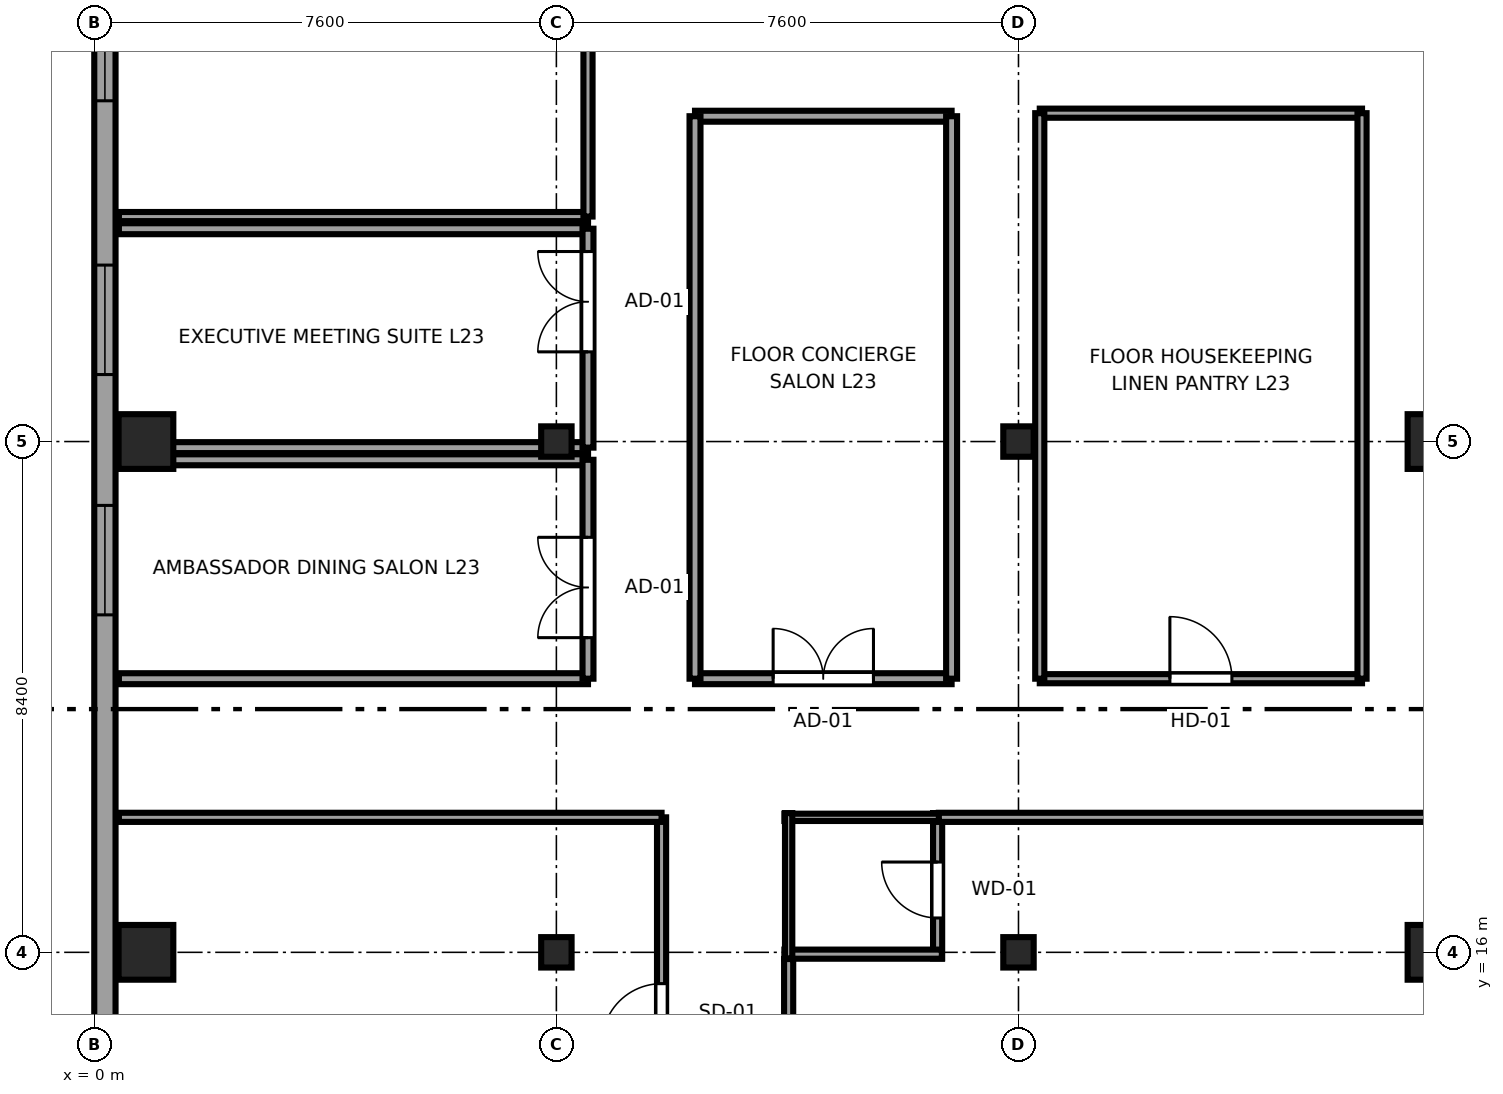
"""IFC4 building model, lengths in metres.
Left out: names, types, materials, properties, quantities, classifications, styles, units other than length and angle.
Written with IfcOpenShell. Run it as: python <this file> out.ifc"""

import sys

from ifc_helpers import new_model, si_unit, direction, frame, frame_2d, origin, origin_2d, place, context, subcontext, project, spatial, rectangle, i_section, extrude, source, transform, mapped, element, fill, save


model = new_model("IFC4")
c1 = context("Model", 3, precision=1e-05, world=origin(), true_north=direction((0.0, 1.0)))
c2 = subcontext(c1, "Body", "Model", "MODEL_VIEW")
j1 = project(units=[si_unit("LENGTHUNIT", "METRE"), si_unit("PLANEANGLEUNIT", "RADIAN")], contexts=[c1])
p1 = place(None, origin())
s1 = spatial("IfcSite", under=j1, at=p1, CompositionType="ELEMENT")
p2 = place(p1, origin())
s2 = spatial("IfcBuilding", under=s1, at=p2, CompositionType="ELEMENT")
p3 = place(p2, frame((0.0, 0.0, 92.35)))
s3 = spatial("IfcBuildingStorey", under=s2, at=p3, CompositionType="ELEMENT", Elevation=92.35)
m1 = source(origin(), c2, "Body", "SweptSolid", [
    extrude(rectangle(XDim=0.9, YDim=0.9, at=origin_2d()), origin(), (0.0, 0.0, 1.0), 3.55),
])
for number, where, z_axis, x_axis in (
    (1, (0.85, 16.0, 0.0), (0.0, 0.0, 1.0), (1.0, 0.0, 0.0)),
    (2, (0.85, 24.4, 0.0), (0.0, 0.0, 1.0), (1.0, 0.0, 0.0)),
):
    element("IfcColumn", number, at=place(p3, frame(where, z_axis=z_axis, x_axis=x_axis)), inside=s3, PredefinedType="COLUMN", context=c2, shape_type="MappedRepresentation", body=[
        mapped(m1, transform((0.0, 0.0, 0.0), x_axis=(1.0, 0.0, 0.0), y_axis=(0.0, 1.0, 0.0), z_axis=(0.0, 0.0, 1.0), scale=1.0)),
    ])
m2 = source(origin(), c2, "Body", "SweptSolid", [
    extrude(i_section(OverallWidth=0.5, OverallDepth=0.5, WebThickness=0.022, FlangeThickness=0.034, at=origin_2d()), origin(), (0.0, 0.0, 1.0), 3.55),
])
for number, where, z_axis, x_axis in (
    (3, (7.6, 16.0, 0.0), (0.0, 0.0, 1.0), (1.0, 0.0, 0.0)),
    (4, (7.6, 24.4, 0.0), (0.0, 0.0, 1.0), (1.0, 0.0, 0.0)),
    (5, (15.2, 16.0, 0.0), (0.0, 0.0, 1.0), (1.0, 0.0, 0.0)),
    (6, (15.2, 24.4, 0.0), (0.0, 0.0, 1.0), (1.0, 0.0, 0.0)),
):
    element("IfcColumn", number, at=place(p3, frame(where, z_axis=z_axis, x_axis=x_axis)), inside=s3, PredefinedType="COLUMN", context=c2, shape_type="MappedRepresentation", body=[
        mapped(m2, transform((0.0, 0.0, 0.0), x_axis=(1.0, 0.0, 0.0), y_axis=(0.0, 1.0, 0.0), z_axis=(0.0, 0.0, 1.0), scale=1.0)),
    ])
for number, where, z_axis, x_axis in (
    (7, (22.05, 16.0, 0.0), (0.0, 0.0, 1.0), (1.0, 0.0, 0.0)),
    (8, (22.05, 24.4, 0.0), (0.0, 0.0, 1.0), (1.0, 0.0, 0.0)),
):
    element("IfcColumn", number, at=place(p3, frame(where, z_axis=z_axis, x_axis=x_axis)), inside=s3, PredefinedType="COLUMN", context=c2, shape_type="MappedRepresentation", body=[
        mapped(m1, transform((0.0, 0.0, 0.0), x_axis=(1.0, 0.0, 0.0), y_axis=(0.0, 1.0, 0.0), z_axis=(0.0, 0.0, 1.0), scale=1.0)),
    ])
p4 = place(p3, frame((0.175, 41.383, 0.0), z_axis=(0.0, 0.0, 1.0), x_axis=(0.0, -1.0, 0.0)))
e9 = element("IfcWall", 9, at=p4, inside=s3, PredefinedType="SOLIDWALL", context=c2, shape_type="SweptSolid", body=[
    extrude(rectangle(XDim=36.766, YDim=0.35, at=frame_2d((18.383, 0.0))), origin(), (0.0, 0.0, 1.0), 3.25),
])
p5 = place(p4, frame((1.676, 0.0, 0.68)))
e10 = element("IfcOpeningElement", 10, at=p5, cuts=e9, PredefinedType="OPENING", context=c2, shape_type="SweptSolid", body=[
    extrude(rectangle(XDim=1.8, YDim=1.85, at=frame_2d((0.9, 0.925))), frame((0.0, 0.185, 0.0), z_axis=(0.0, -1.0, 0.0), x_axis=(1.0, 0.0, 0.0)), (0.0, 0.0, 1.0), 0.37),
])
p6 = place(p4, frame((4.578, 0.0, 0.68)))
e11 = element("IfcOpeningElement", 11, at=p6, cuts=e9, PredefinedType="OPENING", context=c2, shape_type="SweptSolid", body=[
    extrude(rectangle(XDim=1.8, YDim=1.85, at=frame_2d((0.9, 0.925))), frame((0.0, 0.185, 0.0), z_axis=(0.0, -1.0, 0.0), x_axis=(1.0, 0.0, 0.0)), (0.0, 0.0, 1.0), 0.37),
])
p7 = place(p4, frame((9.579, 0.0, 0.68)))
e12 = element("IfcOpeningElement", 12, at=p7, cuts=e9, PredefinedType="OPENING", context=c2, shape_type="SweptSolid", body=[
    extrude(rectangle(XDim=1.8, YDim=1.85, at=frame_2d((0.9, 0.925))), frame((0.0, 0.185, 0.0), z_axis=(0.0, -1.0, 0.0), x_axis=(1.0, 0.0, 0.0)), (0.0, 0.0, 1.0), 0.37),
])
p8 = place(p4, frame((14.081, 0.0, 0.68)))
e13 = element("IfcOpeningElement", 13, at=p8, cuts=e9, PredefinedType="OPENING", context=c2, shape_type="SweptSolid", body=[
    extrude(rectangle(XDim=1.8, YDim=1.85, at=frame_2d((0.9, 0.925))), frame((0.0, 0.185, 0.0), z_axis=(0.0, -1.0, 0.0), x_axis=(1.0, 0.0, 0.0)), (0.0, 0.0, 1.0), 0.37),
])
p9 = place(p4, frame((18.033, 0.0, 0.68)))
e14 = element("IfcOpeningElement", 14, at=p9, cuts=e9, PredefinedType="OPENING", context=c2, shape_type="SweptSolid", body=[
    extrude(rectangle(XDim=1.8, YDim=1.85, at=frame_2d((0.9, 0.925))), frame((0.0, 0.185, 0.0), z_axis=(0.0, -1.0, 0.0), x_axis=(1.0, 0.0, 0.0)), (0.0, 0.0, 1.0), 0.37),
])
p10 = place(p4, frame((26.436, 0.0, 0.68)))
e15 = element("IfcOpeningElement", 15, at=p10, cuts=e9, PredefinedType="OPENING", context=c2, shape_type="SweptSolid", body=[
    extrude(rectangle(XDim=1.8, YDim=1.85, at=frame_2d((0.9, 0.925))), frame((0.0, 0.185, 0.0), z_axis=(0.0, -1.0, 0.0), x_axis=(1.0, 0.0, 0.0)), (0.0, 0.0, 1.0), 0.37),
])
p11 = place(p4, frame((29.338, 0.0, 0.68)))
e16 = element("IfcOpeningElement", 16, at=p11, cuts=e9, PredefinedType="OPENING", context=c2, shape_type="SweptSolid", body=[
    extrude(rectangle(XDim=1.8, YDim=1.85, at=frame_2d((0.9, 0.925))), frame((0.0, 0.185, 0.0), z_axis=(0.0, -1.0, 0.0), x_axis=(1.0, 0.0, 0.0)), (0.0, 0.0, 1.0), 0.37),
])
p12 = place(p4, frame((34.34, 0.0, 0.68)))
e17 = element("IfcOpeningElement", 17, at=p12, cuts=e9, PredefinedType="OPENING", context=c2, shape_type="SweptSolid", body=[
    extrude(rectangle(XDim=1.8, YDim=1.85, at=frame_2d((0.9, 0.925))), frame((0.0, 0.185, 0.0), z_axis=(0.0, -1.0, 0.0), x_axis=(1.0, 0.0, 0.0)), (0.0, 0.0, 1.0), 0.37),
])
p13 = place(p3, frame((13.87, 15.9, 0.0), z_axis=(0.0, 0.0, 1.0), x_axis=(0.0, 1.0, 0.0)))
e18 = element("IfcWall", 18, at=p13, inside=s3, PredefinedType="PARTITIONING", context=c2, shape_type="SweptSolid", body=[
    extrude(rectangle(XDim=2.39, YDim=0.15, at=frame_2d((1.195, 0.0))), origin(), (0.0, 0.0, 1.0), 3.25),
])
p14 = place(p13, frame((0.665, 0.0, 0.0)))
e19 = element("IfcOpeningElement", 19, at=p14, cuts=e18, PredefinedType="OPENING", context=c2, shape_type="SweptSolid", body=[
    extrude(rectangle(XDim=0.92, YDim=2.01, at=frame_2d((0.46, 1.005))), frame((0.0, 0.085, 0.0), z_axis=(0.0, -1.0, 0.0), x_axis=(1.0, 0.0, 0.0)), (0.0, 0.0, 1.0), 0.17),
])
p15 = place(p3, frame((11.35, 15.97, 0.0), z_axis=(0.0, 0.0, 1.0), x_axis=(1.0, 0.0, 0.0)))
e20 = element("IfcWall", 20, at=p15, inside=s3, PredefinedType="PARTITIONING", context=c2, shape_type="SweptSolid", body=[
    extrude(rectangle(XDim=2.59, YDim=0.15, at=frame_2d((1.295, 0.0))), origin(), (0.0, 0.0, 1.0), 2.628),
])
p16 = place(p3, frame((11.35, 18.22, 0.0), z_axis=(0.0, 0.0, 1.0), x_axis=(1.0, 0.0, 0.0)))
e21 = element("IfcWall", 21, at=p16, inside=s3, PredefinedType="PLUMBINGWALL", context=c2, shape_type="SweptSolid", body=[
    extrude(rectangle(XDim=2.59, YDim=0.12, at=frame_2d((1.295, 0.0))), origin(), (0.0, 0.0, 1.0), 3.25),
])
p17 = place(p3, frame((11.42, 15.9, 0.0), z_axis=(0.0, 0.0, 1.0), x_axis=(0.0, 1.0, 0.0)))
e22 = element("IfcWall", 22, at=p17, inside=s3, PredefinedType="PLUMBINGWALL", context=c2, shape_type="SweptSolid", body=[
    extrude(rectangle(XDim=2.39, YDim=0.12, at=frame_2d((1.195, 0.0))), origin(), (0.0, 0.0, 1.0), 2.834),
])
p18 = place(p3, frame((9.33, 11.81, 0.0), z_axis=(0.0, 0.0, 1.0), x_axis=(0.0, 1.0, 0.0)))
e23 = element("IfcWall", 23, at=p18, inside=s3, PredefinedType="PARTITIONING", context=c2, shape_type="SweptSolid", body=[
    extrude(rectangle(XDim=6.41, YDim=0.15, at=frame_2d((3.205, 0.0))), origin(), (0.0, 0.0, 1.0), 3.25),
])
p19 = place(p18, frame((2.695, 0.0, 0.0)))
e24 = element("IfcOpeningElement", 24, at=p19, cuts=e23, PredefinedType="OPENING", context=c2, shape_type="SweptSolid", body=[
    extrude(rectangle(XDim=0.98, YDim=2.12, at=frame_2d((0.49, 1.06))), frame((0.0, 0.085, 0.0), z_axis=(0.0, -1.0, 0.0), x_axis=(1.0, 0.0, 0.0)), (0.0, 0.0, 1.0), 0.17),
])
p20 = place(p3, frame((0.405, 18.22, 0.0), z_axis=(0.0, 0.0, 1.0), x_axis=(1.0, 0.0, 0.0)))
e25 = element("IfcWall", 25, at=p20, inside=s3, PredefinedType="PARTITIONING", context=c2, shape_type="SweptSolid", body=[
    extrude(rectangle(XDim=8.925, YDim=0.15, at=frame_2d((4.462, 0.0))), origin(), (0.0, 0.0, 1.0), 3.25),
])
p21 = place(p3, frame((11.42, 0.405, 0.0), z_axis=(0.0, 0.0, 1.0), x_axis=(0.0, 1.0, 0.0)))
e26 = element("IfcWall", 26, at=p21, inside=s3, PredefinedType="PARTITIONING", context=c2, shape_type="SweptSolid", body=[
    extrude(rectangle(XDim=15.485, YDim=0.15, at=frame_2d((7.742, 0.0))), origin(), (0.0, 0.0, 1.0), 2.834),
])
p22 = place(p21, frame((7.26, 0.0, 0.0)))
e27 = element("IfcOpeningElement", 27, at=p22, cuts=e26, PredefinedType="OPENING", context=c2, shape_type="SweptSolid", body=[
    extrude(rectangle(XDim=0.98, YDim=2.12, at=frame_2d((0.49, 1.06))), frame((0.0, 0.085, 0.0), z_axis=(0.0, -1.0, 0.0), x_axis=(1.0, 0.0, 0.0)), (0.0, 0.0, 1.0), 0.17),
])
p23 = place(p3, frame((13.89, 18.22, 0.0), z_axis=(0.0, 0.0, 1.0), x_axis=(1.0, 0.0, 0.0)))
e28 = element("IfcWall", 28, at=p23, inside=s3, PredefinedType="PARTITIONING", context=c2, shape_type="SweptSolid", body=[
    extrude(rectangle(XDim=8.46, YDim=0.15, at=frame_2d((4.23, 0.0))), origin(), (0.0, 0.0, 1.0), 3.25),
])
for number, where, z_axis, x_axis in (
    (29, (0.405, 20.5, 0.0), (0.0, 0.0, 1.0), (1.0, 0.0, 0.0)),
    (30, (0.405, 24.1, 0.0), (0.0, 0.0, 1.0), (1.0, 0.0, 0.0)),
):
    element("IfcWall", number, at=place(p3, frame(where, z_axis=z_axis, x_axis=x_axis)), inside=s3, PredefinedType="PARTITIONING", context=c2, shape_type="SweptSolid", body=[
        extrude(rectangle(XDim=7.715, YDim=0.18, at=frame_2d((3.857, 0.0))), origin(), (0.0, 0.0, 1.0), 3.25),
    ])
p24 = place(p3, frame((8.12, 20.5, 0.0), z_axis=(0.0, 0.0, 1.0), x_axis=(0.0, 1.0, 0.0)))
e31 = element("IfcWall", 31, at=p24, inside=s3, PredefinedType="PARTITIONING", context=c2, shape_type="SweptSolid", body=[
    extrude(rectangle(XDim=3.6, YDim=0.18, at=frame_2d((1.8, 0.0))), origin(), (0.0, 0.0, 1.0), 3.25),
])
p25 = place(p24, frame((0.675, 0.0, 0.0)))
e32 = element("IfcOpeningElement", 32, at=p25, cuts=e31, PredefinedType="OPENING", context=c2, shape_type="SweptSolid", body=[
    extrude(rectangle(XDim=1.65, YDim=2.15, at=frame_2d((0.825, 1.075))), frame((0.0, 0.1, 0.0), z_axis=(0.0, -1.0, 0.0), x_axis=(1.0, 0.0, 0.0)), (0.0, 0.0, 1.0), 0.2),
])
p26 = place(p3, frame((0.405, 24.3, 0.0), z_axis=(0.0, 0.0, 1.0), x_axis=(1.0, 0.0, 0.0)))
e33 = element("IfcWall", 33, at=p26, inside=s3, PredefinedType="PARTITIONING", context=c2, shape_type="SweptSolid", body=[
    extrude(rectangle(XDim=7.715, YDim=0.18, at=frame_2d((3.857, 0.0))), origin(), (0.0, 0.0, 1.0), 2.628),
])
p27 = place(p3, frame((0.405, 27.9, 0.0), z_axis=(0.0, 0.0, 1.0), x_axis=(1.0, 0.0, 0.0)))
e34 = element("IfcWall", 34, at=p27, inside=s3, PredefinedType="PARTITIONING", context=c2, shape_type="SweptSolid", body=[
    extrude(rectangle(XDim=7.715, YDim=0.18, at=frame_2d((3.857, 0.0))), origin(), (0.0, 0.0, 1.0), 3.25),
])
p28 = place(p3, frame((8.12, 24.3, 0.0), z_axis=(0.0, 0.0, 1.0), x_axis=(0.0, 1.0, 0.0)))
e35 = element("IfcWall", 35, at=p28, inside=s3, PredefinedType="PARTITIONING", context=c2, shape_type="SweptSolid", body=[
    extrude(rectangle(XDim=3.6, YDim=0.18, at=frame_2d((1.8, 0.0))), origin(), (0.0, 0.0, 1.0), 3.25),
])
p29 = place(p28, frame((1.575, 0.0, 0.0)))
e36 = element("IfcOpeningElement", 36, at=p29, cuts=e35, PredefinedType="OPENING", context=c2, shape_type="SweptSolid", body=[
    extrude(rectangle(XDim=1.65, YDim=2.15, at=frame_2d((0.825, 1.075))), frame((0.0, 0.1, 0.0), z_axis=(0.0, -1.0, 0.0), x_axis=(1.0, 0.0, 0.0)), (0.0, 0.0, 1.0), 0.2),
])
p30 = place(p3, frame((0.405, 28.1, 0.0), z_axis=(0.0, 0.0, 1.0), x_axis=(1.0, 0.0, 0.0)))
e37 = element("IfcWall", 37, at=p30, inside=s3, PredefinedType="PARTITIONING", context=c2, shape_type="SweptSolid", body=[
    extrude(rectangle(XDim=7.715, YDim=0.15, at=frame_2d((3.857, 0.0))), origin(), (0.0, 0.0, 1.0), 3.25),
])
p31 = place(p3, frame((8.12, 28.1, 0.0), z_axis=(0.0, 0.0, 1.0), x_axis=(0.0, 1.0, 0.0)))
e38 = element("IfcWall", 38, at=p31, inside=s3, PredefinedType="PARTITIONING", context=c2, shape_type="SweptSolid", body=[
    extrude(rectangle(XDim=17.495, YDim=0.15, at=frame_2d((8.748, 0.0))), origin(), (0.0, 0.0, 1.0), 3.25),
])
p32 = place(p31, frame((7.923, 0.0, 0.0)))
e39 = element("IfcOpeningElement", 39, at=p32, cuts=e38, PredefinedType="OPENING", context=c2, shape_type="SweptSolid", body=[
    extrude(rectangle(XDim=1.65, YDim=2.15, at=frame_2d((0.825, 1.075))), frame((0.0, 0.085, 0.0), z_axis=(0.0, -1.0, 0.0), x_axis=(1.0, 0.0, 0.0)), (0.0, 0.0, 1.0), 0.17),
])
p33 = place(p3, frame((9.88, 20.5, 0.0), z_axis=(0.0, 0.0, 1.0), x_axis=(1.0, 0.0, 0.0)))
e40 = element("IfcWall", 40, at=p33, inside=s3, PredefinedType="PARTITIONING", context=c2, shape_type="SweptSolid", body=[
    extrude(rectangle(XDim=4.22, YDim=0.18, at=frame_2d((2.11, 0.0))), origin(), (0.0, 0.0, 1.0), 3.25),
])
p34 = place(p33, frame((1.285, 0.0, 0.0)))
e41 = element("IfcOpeningElement", 41, at=p34, cuts=e40, PredefinedType="OPENING", context=c2, shape_type="SweptSolid", body=[
    extrude(rectangle(XDim=1.65, YDim=2.15, at=frame_2d((0.825, 1.075))), frame((0.0, 0.1, 0.0), z_axis=(0.0, -1.0, 0.0), x_axis=(1.0, 0.0, 0.0)), (0.0, 0.0, 1.0), 0.2),
])
p35 = place(p3, frame((9.88, 29.75, 0.0), z_axis=(0.0, 0.0, 1.0), x_axis=(1.0, 0.0, 0.0)))
e42 = element("IfcWall", 42, at=p35, inside=s3, PredefinedType="PARTITIONING", context=c2, shape_type="SweptSolid", body=[
    extrude(rectangle(XDim=4.22, YDim=0.18, at=frame_2d((2.11, 0.0))), origin(), (0.0, 0.0, 1.0), 3.25),
])
for number, where, z_axis, x_axis in (
    (43, (9.88, 20.5, 0.0), (0.0, 0.0, 1.0), (0.0, 1.0, 0.0)),
    (44, (14.1, 20.5, 0.0), (0.0, 0.0, 1.0), (0.0, 1.0, 0.0)),
):
    element("IfcWall", number, at=place(p3, frame(where, z_axis=z_axis, x_axis=x_axis)), inside=s3, PredefinedType="PARTITIONING", context=c2, shape_type="SweptSolid", body=[
        extrude(rectangle(XDim=9.25, YDim=0.18, at=frame_2d((4.625, 0.0))), origin(), (0.0, 0.0, 1.0), 3.25),
    ])
p36 = place(p3, frame((15.55, 20.5, 0.0), z_axis=(0.0, 0.0, 1.0), x_axis=(1.0, 0.0, 0.0)))
e45 = element("IfcWall", 45, at=p36, inside=s3, PredefinedType="PARTITIONING", context=c2, shape_type="SweptSolid", body=[
    extrude(rectangle(XDim=5.3, YDim=0.15, at=frame_2d((2.65, 0.0))), origin(), (0.0, 0.0, 1.0), 3.25),
])
p37 = place(p36, frame((2.14, 0.0, 0.0)))
e46 = element("IfcOpeningElement", 46, at=p37, cuts=e45, PredefinedType="OPENING", context=c2, shape_type="SweptSolid", body=[
    extrude(rectangle(XDim=1.02, YDim=2.03, at=frame_2d((0.51, 1.015))), frame((0.0, 0.085, 0.0), z_axis=(0.0, -1.0, 0.0), x_axis=(1.0, 0.0, 0.0)), (0.0, 0.0, 1.0), 0.17),
])
p38 = place(p3, frame((15.55, 29.8, 0.0), z_axis=(0.0, 0.0, 1.0), x_axis=(1.0, 0.0, 0.0)))
e47 = element("IfcWall", 47, at=p38, inside=s3, PredefinedType="PARTITIONING", context=c2, shape_type="SweptSolid", body=[
    extrude(rectangle(XDim=5.3, YDim=0.15, at=frame_2d((2.65, 0.0))), origin(), (0.0, 0.0, 1.0), 3.25),
])
for number, where, z_axis, x_axis in (
    (48, (15.55, 20.5, 0.0), (0.0, 0.0, 1.0), (0.0, 1.0, 0.0)),
    (49, (20.85, 20.5, 0.0), (0.0, 0.0, 1.0), (0.0, 1.0, 0.0)),
):
    element("IfcWall", number, at=place(p3, frame(where, z_axis=z_axis, x_axis=x_axis)), inside=s3, PredefinedType="PARTITIONING", context=c2, shape_type="SweptSolid", body=[
        extrude(rectangle(XDim=9.3, YDim=0.15, at=frame_2d((4.65, 0.0))), origin(), (0.0, 0.0, 1.0), 3.25),
    ])
m3 = source(origin(), c2, "Body", "SweptSolid", [
    extrude(rectangle(XDim=1.8, YDim=1.85, at=frame_2d((0.9, 0.925))), frame((0.0, 0.09, 0.0), z_axis=(0.0, -1.0, 0.0), x_axis=(1.0, 0.0, 0.0)), (0.0, 0.0, 1.0), 0.06),
])
p39 = place(p7, origin())
e50 = element("IfcWindow", 50, at=p39, inside=s3, PartitioningType="TRIPLE_PANEL_HORIZONTAL", PredefinedType="WINDOW", context=c2, shape_type="MappedRepresentation", body=[
    mapped(m3, transform((0.0, 0.0, 0.0), x_axis=(1.0, 0.0, 0.0), y_axis=(0.0, 1.0, 0.0), z_axis=(0.0, 0.0, 1.0), scale=1.0)),
])
fill(e12, e50)
p40 = place(p8, origin())
e51 = element("IfcWindow", 51, at=p40, inside=s3, PartitioningType="TRIPLE_PANEL_HORIZONTAL", PredefinedType="WINDOW", context=c2, shape_type="MappedRepresentation", body=[
    mapped(m3, transform((0.0, 0.0, 0.0), x_axis=(1.0, 0.0, 0.0), y_axis=(0.0, 1.0, 0.0), z_axis=(0.0, 0.0, 1.0), scale=1.0)),
])
fill(e13, e51)
p41 = place(p9, origin())
e52 = element("IfcWindow", 52, at=p41, inside=s3, PartitioningType="TRIPLE_PANEL_HORIZONTAL", PredefinedType="WINDOW", context=c2, shape_type="MappedRepresentation", body=[
    mapped(m3, transform((0.0, 0.0, 0.0), x_axis=(1.0, 0.0, 0.0), y_axis=(0.0, 1.0, 0.0), z_axis=(0.0, 0.0, 1.0), scale=1.0)),
])
fill(e14, e52)
m4 = source(origin(), c2, "Body", "SweptSolid", [
    extrude(rectangle(XDim=0.92, YDim=2.01, at=frame_2d((0.46, 1.005))), frame((0.0, 0.025, 0.0), z_axis=(0.0, -1.0, 0.0), x_axis=(1.0, 0.0, 0.0)), (0.0, 0.0, 1.0), 0.05),
])
p42 = place(p14, origin())
e53 = element("IfcDoor", 53, at=p42, inside=s3, OperationType="SINGLE_SWING_RIGHT", PredefinedType="DOOR", context=c2, shape_type="MappedRepresentation", body=[
    mapped(m4, transform((0.0, 0.0, 0.0), x_axis=(1.0, 0.0, 0.0), y_axis=(0.0, 1.0, 0.0), z_axis=(0.0, 0.0, 1.0), scale=1.0)),
])
fill(e19, e53)
m5 = source(origin(), c2, "Body", "SweptSolid", [
    extrude(rectangle(XDim=0.98, YDim=2.12, at=frame_2d((0.49, 1.06))), frame((0.0, 0.025, 0.0), z_axis=(0.0, -1.0, 0.0), x_axis=(1.0, 0.0, 0.0)), (0.0, 0.0, 1.0), 0.05),
])
p43 = place(p19, origin())
e54 = element("IfcDoor", 54, at=p43, inside=s3, OperationType="SINGLE_SWING_LEFT", PredefinedType="DOOR", context=c2, shape_type="MappedRepresentation", body=[
    mapped(m5, transform((0.0, 0.0, 0.0), x_axis=(1.0, 0.0, 0.0), y_axis=(0.0, 1.0, 0.0), z_axis=(0.0, 0.0, 1.0), scale=1.0)),
])
fill(e24, e54)
m6 = source(origin(), c2, "Body", "SweptSolid", [
    extrude(rectangle(XDim=1.65, YDim=2.15, at=frame_2d((0.825, 1.075))), frame((0.0, 0.025, 0.0), z_axis=(0.0, -1.0, 0.0), x_axis=(1.0, 0.0, 0.0)), (0.0, 0.0, 1.0), 0.05),
])
p44 = place(p25, origin())
e55 = element("IfcDoor", 55, at=p44, inside=s3, OperationType="DOUBLE_DOOR_SINGLE_SWING", PredefinedType="DOOR", context=c2, shape_type="MappedRepresentation", body=[
    mapped(m6, transform((0.0, 0.0, 0.0), x_axis=(1.0, 0.0, 0.0), y_axis=(0.0, 1.0, 0.0), z_axis=(0.0, 0.0, 1.0), scale=1.0)),
])
fill(e32, e55)
p45 = place(p29, origin())
e56 = element("IfcDoor", 56, at=p45, inside=s3, OperationType="DOUBLE_DOOR_SINGLE_SWING", PredefinedType="DOOR", context=c2, shape_type="MappedRepresentation", body=[
    mapped(m6, transform((0.0, 0.0, 0.0), x_axis=(1.0, 0.0, 0.0), y_axis=(0.0, 1.0, 0.0), z_axis=(0.0, 0.0, 1.0), scale=1.0)),
])
fill(e36, e56)
p46 = place(p34, origin())
e57 = element("IfcDoor", 57, at=p46, inside=s3, OperationType="DOUBLE_DOOR_SINGLE_SWING", PredefinedType="DOOR", context=c2, shape_type="MappedRepresentation", body=[
    mapped(m6, transform((0.0, 0.0, 0.0), x_axis=(1.0, 0.0, 0.0), y_axis=(0.0, 1.0, 0.0), z_axis=(0.0, 0.0, 1.0), scale=1.0)),
])
fill(e41, e57)
m7 = source(origin(), c2, "Body", "SweptSolid", [
    extrude(rectangle(XDim=1.02, YDim=2.03, at=frame_2d((0.51, 1.015))), frame((0.0, 0.025, 0.0), z_axis=(0.0, -1.0, 0.0), x_axis=(1.0, 0.0, 0.0)), (0.0, 0.0, 1.0), 0.05),
])
p47 = place(p37, origin())
e58 = element("IfcDoor", 58, at=p47, inside=s3, OperationType="SINGLE_SWING_LEFT", PredefinedType="DOOR", context=c2, shape_type="MappedRepresentation", body=[
    mapped(m7, transform((0.0, 0.0, 0.0), x_axis=(1.0, 0.0, 0.0), y_axis=(0.0, 1.0, 0.0), z_axis=(0.0, 0.0, 1.0), scale=1.0)),
])
fill(e46, e58)
save(model, sys.argv[1])
